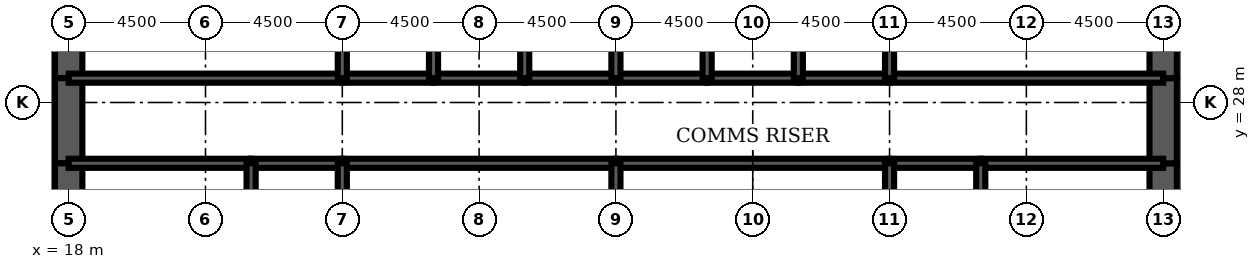
"""IFC4 building model, lengths in metres.
Left out: names, types, materials, properties, quantities, classifications, styles, units other than length and angle.
Written with IfcOpenShell. Run it as: python <this file> out.ifc"""

import sys

from ifc_helpers import new_model, si_unit, direction, frame, frame_2d, origin, place, context, subcontext, project, spatial, rectangle, extrude, element, fill, save


model = new_model("IFC4")
c1 = context("Model", 3, precision=1e-05, world=origin(), true_north=direction((0.0, 1.0)))
c2 = subcontext(c1, "Body", "Model", "MODEL_VIEW")
j1 = project(units=[si_unit("LENGTHUNIT", "METRE"), si_unit("PLANEANGLEUNIT", "RADIAN")], contexts=[c1])
p1 = place(None, origin())
s1 = spatial("IfcSite", under=j1, at=p1, CompositionType="ELEMENT")
p2 = place(p1, origin())
s2 = spatial("IfcBuilding", under=s1, at=p2, CompositionType="ELEMENT")
p3 = place(p2, frame((0.0, 0.0, 121.5)))
s3 = spatial("IfcBuildingStorey", under=s2, at=p3, CompositionType="ELEMENT", Elevation=121.5)
p4 = place(p3, frame((18.0, 32.0, 0.0), z_axis=(0.0, 0.0, 1.0), x_axis=(0.0, -1.0, 0.0)))
e1 = element("IfcWall", 1, at=p4, inside=s3, PredefinedType="SHEAR", context=c2, shape_type="SweptSolid", body=[
    extrude(rectangle(XDim=3.2, YDim=0.9, at=frame_2d((1.6, 0.0))), origin(), (0.0, 0.0, 1.0), 4.2),
])
p5 = place(p3, frame((18.0, 28.8, 0.0), z_axis=(0.0, 0.0, 1.0), x_axis=(0.0, -1.0, 0.0)))
e2 = element("IfcWall", 2, at=p5, inside=s3, PredefinedType="SHEAR", context=c2, shape_type="SweptSolid", body=[
    extrude(rectangle(XDim=2.8, YDim=0.9, at=frame_2d((1.4, 0.0))), origin(), (0.0, 0.0, 1.0), 4.2),
])
p6 = place(p5, frame((0.4, 0.0, 0.0)))
e3 = element("IfcOpeningElement", 3, at=p6, cuts=e2, PredefinedType="OPENING", context=c2, shape_type="SweptSolid", body=[
    extrude(rectangle(XDim=1.8, YDim=2.1, at=frame_2d((0.9, 1.05))), frame((0.0, 0.46, 0.0), z_axis=(0.0, -1.0, 0.0), x_axis=(1.0, 0.0, 0.0)), (0.0, 0.0, 1.0), 0.92),
])
for number, where, z_axis, x_axis in (
    (4, (18.0, 26.0, 0.0), (0.0, 0.0, 1.0), (0.0, -1.0, 0.0)),
    (5, (54.0, 22.0, 0.0), (0.0, 0.0, 1.0), (0.0, 1.0, 0.0)),
):
    element("IfcWall", number, at=place(p3, frame(where, z_axis=z_axis, x_axis=x_axis)), inside=s3, PredefinedType="SHEAR", context=c2, shape_type="SweptSolid", body=[
        extrude(rectangle(XDim=4.0, YDim=0.9, at=frame_2d((2.0, 0.0))), origin(), (0.0, 0.0, 1.0), 4.2),
    ])
p7 = place(p3, frame((54.0, 26.0, 0.0), z_axis=(0.0, 0.0, 1.0), x_axis=(0.0, 1.0, 0.0)))
e6 = element("IfcWall", 6, at=p7, inside=s3, PredefinedType="SHEAR", context=c2, shape_type="SweptSolid", body=[
    extrude(rectangle(XDim=2.8, YDim=0.9, at=frame_2d((1.4, 0.0))), origin(), (0.0, 0.0, 1.0), 4.2),
])
p8 = place(p7, frame((0.6, 0.0, 0.0)))
e7 = element("IfcOpeningElement", 7, at=p8, cuts=e6, PredefinedType="OPENING", context=c2, shape_type="SweptSolid", body=[
    extrude(rectangle(XDim=1.8, YDim=2.1, at=frame_2d((0.9, 1.05))), frame((0.0, 0.46, 0.0), z_axis=(0.0, -1.0, 0.0), x_axis=(1.0, 0.0, 0.0)), (0.0, 0.0, 1.0), 0.92),
])
p9 = place(p3, frame((54.0, 28.8, 0.0), z_axis=(0.0, 0.0, 1.0), x_axis=(0.0, 1.0, 0.0)))
e8 = element("IfcWall", 8, at=p9, inside=s3, PredefinedType="SHEAR", context=c2, shape_type="SweptSolid", body=[
    extrude(rectangle(XDim=3.2, YDim=0.9, at=frame_2d((1.6, 0.0))), origin(), (0.0, 0.0, 1.0), 4.2),
])
p10 = place(p3, frame((18.0, 28.8, 0.0), z_axis=(0.0, 0.0, 1.0), x_axis=(1.0, 0.0, 0.0)))
e9 = element("IfcWall", 9, at=p10, inside=s3, PredefinedType="SOLIDWALL", context=c2, shape_type="SweptSolid", body=[
    extrude(rectangle(XDim=9.0, YDim=0.3, at=frame_2d((4.5, 0.0))), origin(), (0.0, 0.0, 1.0), 4.2),
])
p11 = place(p10, frame((0.65, 0.0, 0.0)))
e10 = element("IfcOpeningElement", 10, at=p11, cuts=e9, PredefinedType="OPENING", context=c2, shape_type="SweptSolid", body=[
    extrude(rectangle(XDim=1.0, YDim=2.1, at=frame_2d((0.5, 1.05))), frame((0.0, 0.16, 0.0), z_axis=(0.0, -1.0, 0.0), x_axis=(1.0, 0.0, 0.0)), (0.0, 0.0, 1.0), 0.32),
])
p12 = place(p3, frame((27.0, 28.8, 0.0), z_axis=(0.0, 0.0, 1.0), x_axis=(1.0, 0.0, 0.0)))
e11 = element("IfcWall", 11, at=p12, inside=s3, PredefinedType="SOLIDWALL", context=c2, shape_type="SweptSolid", body=[
    extrude(rectangle(XDim=3.0, YDim=0.3, at=frame_2d((1.5, 0.0))), origin(), (0.0, 0.0, 1.0), 4.2),
])
p13 = place(p12, frame((0.95, 0.0, 0.0)))
e12 = element("IfcOpeningElement", 12, at=p13, cuts=e11, PredefinedType="OPENING", context=c2, shape_type="SweptSolid", body=[
    extrude(rectangle(XDim=1.1, YDim=2.2, at=frame_2d((0.55, 1.1))), frame((0.0, 0.16, 0.0), z_axis=(0.0, -1.0, 0.0), x_axis=(1.0, 0.0, 0.0)), (0.0, 0.0, 1.0), 0.32),
])
p14 = place(p3, frame((30.0, 28.8, 0.0), z_axis=(0.0, 0.0, 1.0), x_axis=(1.0, 0.0, 0.0)))
e13 = element("IfcWall", 13, at=p14, inside=s3, PredefinedType="SOLIDWALL", context=c2, shape_type="SweptSolid", body=[
    extrude(rectangle(XDim=3.0, YDim=0.3, at=frame_2d((1.5, 0.0))), origin(), (0.0, 0.0, 1.0), 4.2),
])
p15 = place(p14, frame((0.95, 0.0, 0.0)))
e14 = element("IfcOpeningElement", 14, at=p15, cuts=e13, PredefinedType="OPENING", context=c2, shape_type="SweptSolid", body=[
    extrude(rectangle(XDim=1.1, YDim=2.2, at=frame_2d((0.55, 1.1))), frame((0.0, 0.16, 0.0), z_axis=(0.0, -1.0, 0.0), x_axis=(1.0, 0.0, 0.0)), (0.0, 0.0, 1.0), 0.32),
])
p16 = place(p3, frame((33.0, 28.8, 0.0), z_axis=(0.0, 0.0, 1.0), x_axis=(1.0, 0.0, 0.0)))
e15 = element("IfcWall", 15, at=p16, inside=s3, PredefinedType="SOLIDWALL", context=c2, shape_type="SweptSolid", body=[
    extrude(rectangle(XDim=3.0, YDim=0.3, at=frame_2d((1.5, 0.0))), origin(), (0.0, 0.0, 1.0), 4.2),
])
p17 = place(p16, frame((0.95, 0.0, 0.0)))
e16 = element("IfcOpeningElement", 16, at=p17, cuts=e15, PredefinedType="OPENING", context=c2, shape_type="SweptSolid", body=[
    extrude(rectangle(XDim=1.1, YDim=2.2, at=frame_2d((0.55, 1.1))), frame((0.0, 0.16, 0.0), z_axis=(0.0, -1.0, 0.0), x_axis=(1.0, 0.0, 0.0)), (0.0, 0.0, 1.0), 0.32),
])
for number, where, z_axis, x_axis in (
    (17, (36.0, 28.8, 0.0), (0.0, 0.0, 1.0), (1.0, 0.0, 0.0)),
    (18, (39.0, 28.8, 0.0), (0.0, 0.0, 1.0), (1.0, 0.0, 0.0)),
):
    element("IfcWall", number, at=place(p3, frame(where, z_axis=z_axis, x_axis=x_axis)), inside=s3, PredefinedType="SOLIDWALL", context=c2, shape_type="SweptSolid", body=[
        extrude(rectangle(XDim=3.0, YDim=0.3, at=frame_2d((1.5, 0.0))), origin(), (0.0, 0.0, 1.0), 4.2),
    ])
p18 = place(p3, frame((42.0, 28.8, 0.0), z_axis=(0.0, 0.0, 1.0), x_axis=(1.0, 0.0, 0.0)))
e19 = element("IfcWall", 19, at=p18, inside=s3, PredefinedType="SOLIDWALL", context=c2, shape_type="SweptSolid", body=[
    extrude(rectangle(XDim=3.0, YDim=0.3, at=frame_2d((1.5, 0.0))), origin(), (0.0, 0.0, 1.0), 4.2),
])
p19 = place(p18, frame((0.95, 0.0, 0.0)))
e20 = element("IfcOpeningElement", 20, at=p19, cuts=e19, PredefinedType="OPENING", context=c2, shape_type="SweptSolid", body=[
    extrude(rectangle(XDim=1.1, YDim=2.2, at=frame_2d((0.55, 1.1))), frame((0.0, 0.16, 0.0), z_axis=(0.0, -1.0, 0.0), x_axis=(1.0, 0.0, 0.0)), (0.0, 0.0, 1.0), 0.32),
])
p20 = place(p3, frame((45.0, 28.8, 0.0), z_axis=(0.0, 0.0, 1.0), x_axis=(1.0, 0.0, 0.0)))
e21 = element("IfcWall", 21, at=p20, inside=s3, PredefinedType="SOLIDWALL", context=c2, shape_type="SweptSolid", body=[
    extrude(rectangle(XDim=9.0, YDim=0.3, at=frame_2d((4.5, 0.0))), origin(), (0.0, 0.0, 1.0), 4.2),
])
p21 = place(p20, frame((7.35, 0.0, 0.0)))
e22 = element("IfcOpeningElement", 22, at=p21, cuts=e21, PredefinedType="OPENING", context=c2, shape_type="SweptSolid", body=[
    extrude(rectangle(XDim=1.0, YDim=2.1, at=frame_2d((0.5, 1.05))), frame((0.0, 0.16, 0.0), z_axis=(0.0, -1.0, 0.0), x_axis=(1.0, 0.0, 0.0)), (0.0, 0.0, 1.0), 0.32),
])
p22 = place(p3, frame((18.0, 26.0, 0.0), z_axis=(0.0, 0.0, 1.0), x_axis=(1.0, 0.0, 0.0)))
e23 = element("IfcWall", 23, at=p22, inside=s3, PredefinedType="SOLIDWALL", context=c2, shape_type="SweptSolid", body=[
    extrude(rectangle(XDim=6.0, YDim=0.3, at=frame_2d((3.0, 0.0))), origin(), (0.0, 0.0, 1.0), 4.2),
])
p23 = place(p3, frame((24.0, 26.0, 0.0), z_axis=(0.0, 0.0, 1.0), x_axis=(1.0, 0.0, 0.0)))
e24 = element("IfcWall", 24, at=p23, inside=s3, PredefinedType="SOLIDWALL", context=c2, shape_type="SweptSolid", body=[
    extrude(rectangle(XDim=3.0, YDim=0.3, at=frame_2d((1.5, 0.0))), origin(), (0.0, 0.0, 1.0), 4.2),
])
for number, where, z_axis, x_axis in (
    (25, (27.0, 26.0, 0.0), (0.0, 0.0, 1.0), (1.0, 0.0, 0.0)),
    (26, (36.0, 26.0, 0.0), (0.0, 0.0, 1.0), (1.0, 0.0, 0.0)),
):
    element("IfcWall", number, at=place(p3, frame(where, z_axis=z_axis, x_axis=x_axis)), inside=s3, PredefinedType="SOLIDWALL", context=c2, shape_type="SweptSolid", body=[
        extrude(rectangle(XDim=9.0, YDim=0.3, at=frame_2d((4.5, 0.0))), origin(), (0.0, 0.0, 1.0), 4.2),
    ])
p24 = place(p3, frame((45.0, 26.0, 0.0), z_axis=(0.0, 0.0, 1.0), x_axis=(1.0, 0.0, 0.0)))
e27 = element("IfcWall", 27, at=p24, inside=s3, PredefinedType="SOLIDWALL", context=c2, shape_type="SweptSolid", body=[
    extrude(rectangle(XDim=3.0, YDim=0.3, at=frame_2d((1.5, 0.0))), origin(), (0.0, 0.0, 1.0), 4.2),
])
p25 = place(p3, frame((48.0, 26.0, 0.0), z_axis=(0.0, 0.0, 1.0), x_axis=(1.0, 0.0, 0.0)))
e28 = element("IfcWall", 28, at=p25, inside=s3, PredefinedType="SOLIDWALL", context=c2, shape_type="SweptSolid", body=[
    extrude(rectangle(XDim=6.0, YDim=0.3, at=frame_2d((3.0, 0.0))), origin(), (0.0, 0.0, 1.0), 4.2),
])
for number, where, z_axis, x_axis in (
    (29, (27.0, 28.8, 0.0), (0.0, 0.0, 1.0), (0.0, 1.0, 0.0)),
    (30, (30.0, 28.8, 0.0), (0.0, 0.0, 1.0), (0.0, 1.0, 0.0)),
    (31, (33.0, 28.8, 0.0), (0.0, 0.0, 1.0), (0.0, 1.0, 0.0)),
    (32, (36.0, 28.8, 0.0), (0.0, 0.0, 1.0), (0.0, 1.0, 0.0)),
    (33, (39.0, 28.8, 0.0), (0.0, 0.0, 1.0), (0.0, 1.0, 0.0)),
    (34, (42.0, 28.8, 0.0), (0.0, 0.0, 1.0), (0.0, 1.0, 0.0)),
    (35, (45.0, 28.8, 0.0), (0.0, 0.0, 1.0), (0.0, 1.0, 0.0)),
):
    element("IfcWall", number, at=place(p3, frame(where, z_axis=z_axis, x_axis=x_axis)), inside=s3, PredefinedType="SOLIDWALL", context=c2, shape_type="SweptSolid", body=[
        extrude(rectangle(XDim=3.2, YDim=0.3, at=frame_2d((1.6, 0.0))), origin(), (0.0, 0.0, 1.0), 4.2),
    ])
for number, where, z_axis, x_axis in (
    (36, (24.0, 22.0, 0.0), (0.0, 0.0, 1.0), (0.0, 1.0, 0.0)),
    (37, (27.0, 22.0, 0.0), (0.0, 0.0, 1.0), (0.0, 1.0, 0.0)),
    (38, (36.0, 22.0, 0.0), (0.0, 0.0, 1.0), (0.0, 1.0, 0.0)),
    (39, (45.0, 22.0, 0.0), (0.0, 0.0, 1.0), (0.0, 1.0, 0.0)),
    (40, (48.0, 22.0, 0.0), (0.0, 0.0, 1.0), (0.0, 1.0, 0.0)),
):
    element("IfcWall", number, at=place(p3, frame(where, z_axis=z_axis, x_axis=x_axis)), inside=s3, PredefinedType="SOLIDWALL", context=c2, shape_type="SweptSolid", body=[
        extrude(rectangle(XDim=4.0, YDim=0.3, at=frame_2d((2.0, 0.0))), origin(), (0.0, 0.0, 1.0), 4.2),
    ])
p26 = place(p3, frame((42.0, 22.15, 0.0), z_axis=(0.0, 0.0, 1.0), x_axis=(0.0, 1.0, 0.0)))
e41 = element("IfcWall", 41, at=p26, inside=s3, PredefinedType="PARTITIONING", context=c2, shape_type="SweptSolid", body=[
    extrude(rectangle(XDim=3.7, YDim=0.15, at=frame_2d((1.85, 0.0))), origin(), (0.0, 0.0, 1.0), 3.0),
])
p27 = place(p26, frame((2.2, 0.0, 0.0)))
e42 = element("IfcOpeningElement", 42, at=p27, cuts=e41, PredefinedType="OPENING", context=c2, shape_type="SweptSolid", body=[
    extrude(rectangle(XDim=1.0, YDim=2.1, at=frame_2d((0.5, 1.05))), frame((0.0, 0.085, 0.0), z_axis=(0.0, -1.0, 0.0), x_axis=(1.0, 0.0, 0.0)), (0.0, 0.0, 1.0), 0.17),
])
for number, where, z_axis, x_axis in (
    (43, (20.325, 22.15, 0.0), (0.0, 0.0, 1.0), (0.0, 1.0, 0.0)),
    (44, (51.975, 22.15, 0.0), (0.0, 0.0, 1.0), (0.0, 1.0, 0.0)),
):
    element("IfcWall", number, at=place(p3, frame(where, z_axis=z_axis, x_axis=x_axis)), inside=s3, PredefinedType="PARTITIONING", context=c2, shape_type="SweptSolid", body=[
        extrude(rectangle(XDim=3.7, YDim=0.15, at=frame_2d((1.85, 0.0))), origin(), (0.0, 0.0, 1.0), 3.0),
    ])
p28 = place(p27, origin())
e45 = element("IfcDoor", 45, at=p28, inside=s3, OperationType="SINGLE_SWING_RIGHT", PredefinedType="DOOR", context=c2, shape_type="SweptSolid", body=[
    extrude(rectangle(XDim=1.0, YDim=2.1, at=frame_2d((0.5, 1.05))), frame((0.0, 0.025, 0.0), z_axis=(0.0, -1.0, 0.0), x_axis=(1.0, 0.0, 0.0)), (0.0, 0.0, 1.0), 0.05),
])
fill(e42, e45)
p29 = place(p19, origin())
e46 = element("IfcDoor", 46, at=p29, inside=s3, OperationType="DOUBLE_DOOR_SLIDING", PredefinedType="USERDEFINED", context=c2, shape_type="SweptSolid", body=[
    extrude(rectangle(XDim=1.1, YDim=2.2, at=frame_2d((0.55, 1.1))), frame((0.0, 0.025, 0.0), z_axis=(0.0, -1.0, 0.0), x_axis=(1.0, 0.0, 0.0)), (0.0, 0.0, 1.0), 0.05),
])
fill(e20, e46)
p30 = place(p13, origin())
e47 = element("IfcDoor", 47, at=p30, inside=s3, OperationType="DOUBLE_DOOR_SLIDING", PredefinedType="USERDEFINED", context=c2, shape_type="SweptSolid", body=[
    extrude(rectangle(XDim=1.1, YDim=2.2, at=frame_2d((0.55, 1.1))), frame((0.0, 0.025, 0.0), z_axis=(0.0, -1.0, 0.0), x_axis=(1.0, 0.0, 0.0)), (0.0, 0.0, 1.0), 0.05),
])
fill(e12, e47)
p31 = place(p15, origin())
e48 = element("IfcDoor", 48, at=p31, inside=s3, OperationType="DOUBLE_DOOR_SLIDING", PredefinedType="USERDEFINED", context=c2, shape_type="SweptSolid", body=[
    extrude(rectangle(XDim=1.1, YDim=2.2, at=frame_2d((0.55, 1.1))), frame((0.0, 0.025, 0.0), z_axis=(0.0, -1.0, 0.0), x_axis=(1.0, 0.0, 0.0)), (0.0, 0.0, 1.0), 0.05),
])
fill(e14, e48)
p32 = place(p17, origin())
e49 = element("IfcDoor", 49, at=p32, inside=s3, OperationType="DOUBLE_DOOR_SLIDING", PredefinedType="USERDEFINED", context=c2, shape_type="SweptSolid", body=[
    extrude(rectangle(XDim=1.1, YDim=2.2, at=frame_2d((0.55, 1.1))), frame((0.0, 0.025, 0.0), z_axis=(0.0, -1.0, 0.0), x_axis=(1.0, 0.0, 0.0)), (0.0, 0.0, 1.0), 0.05),
])
fill(e16, e49)
p33 = place(p11, origin())
e50 = element("IfcDoor", 50, at=p33, inside=s3, OperationType="SINGLE_SWING_LEFT", PredefinedType="DOOR", context=c2, shape_type="SweptSolid", body=[
    extrude(rectangle(XDim=1.0, YDim=2.1, at=frame_2d((0.5, 1.05))), frame((0.0, 0.025, 0.0), z_axis=(0.0, -1.0, 0.0), x_axis=(1.0, 0.0, 0.0)), (0.0, 0.0, 1.0), 0.05),
])
fill(e10, e50)
p34 = place(p21, origin())
e51 = element("IfcDoor", 51, at=p34, inside=s3, OperationType="SINGLE_SWING_RIGHT", PredefinedType="DOOR", context=c2, shape_type="SweptSolid", body=[
    extrude(rectangle(XDim=1.0, YDim=2.1, at=frame_2d((0.5, 1.05))), frame((0.0, 0.025, 0.0), z_axis=(0.0, -1.0, 0.0), x_axis=(1.0, 0.0, 0.0)), (0.0, 0.0, 1.0), 0.05),
])
fill(e22, e51)
p35 = place(p6, origin())
e52 = element("IfcDoor", 52, at=p35, inside=s3, OperationType="SINGLE_SWING_LEFT", PredefinedType="DOOR", context=c2, shape_type="SweptSolid", body=[
    extrude(rectangle(XDim=1.8, YDim=2.1, at=frame_2d((0.9, 1.05))), frame((0.0, 0.45, 0.0), z_axis=(0.0, -1.0, 0.0), x_axis=(1.0, 0.0, 0.0)), (0.0, 0.0, 1.0), 0.899),
])
fill(e3, e52)
p36 = place(p8, origin())
e53 = element("IfcDoor", 53, at=p36, inside=s3, OperationType="SINGLE_SWING_LEFT", PredefinedType="DOOR", context=c2, shape_type="SweptSolid", body=[
    extrude(rectangle(XDim=1.8, YDim=2.1, at=frame_2d((0.9, 1.05))), frame((0.0, 0.45, 0.0), z_axis=(0.0, -1.0, 0.0), x_axis=(1.0, 0.0, 0.0)), (0.0, 0.0, 1.0), 0.899),
])
fill(e7, e53)
save(model, sys.argv[1])
